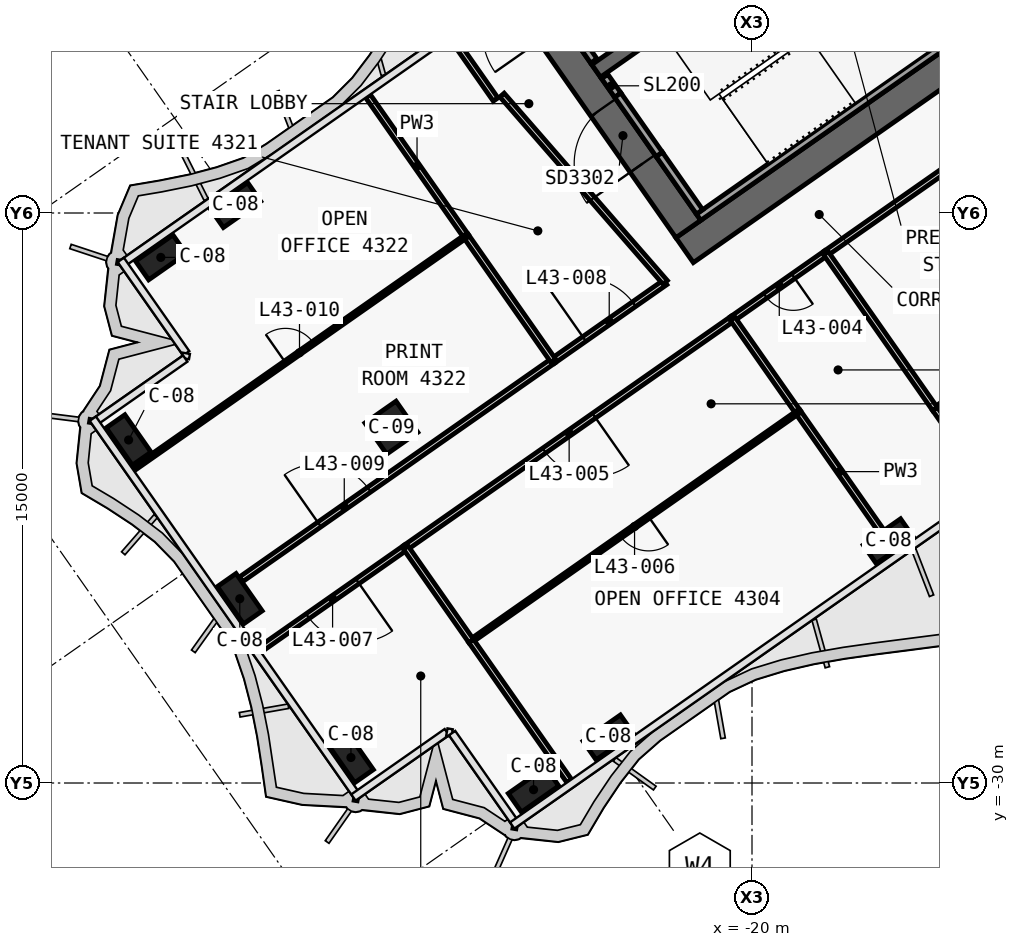
"""IFC4 building model, lengths in metres.
Left out: names, types, materials, properties, quantities, classifications, styles, units other than length and angle.
Written with IfcOpenShell. Run it as: python <this file> out.ifc"""

import sys

from ifc_helpers import new_model, si_unit, direction, frame, frame_2d, origin, origin_2d, place, context, subcontext, project, spatial, polyline, rectangle, outline, extrude, element, fill, save


model = new_model("IFC4")
c1 = context("Model", 3, precision=1e-05, world=origin(), true_north=direction((0.0, 1.0)))
c2 = subcontext(c1, "Body", "Model", "MODEL_VIEW")
j1 = project(units=[si_unit("LENGTHUNIT", "METRE"), si_unit("PLANEANGLEUNIT", "RADIAN")], contexts=[c1])
p1 = place(None, origin())
s1 = spatial("IfcSite", under=j1, at=p1, CompositionType="ELEMENT")
p2 = place(p1, origin())
s2 = spatial("IfcBuilding", under=s1, at=p2, CompositionType="ELEMENT")
p3 = place(p2, frame((0.0, 0.0, 186.6)))
s3 = spatial("IfcBuildingStorey", under=s2, at=p3, CompositionType="ELEMENT", Elevation=186.6)
p4 = place(p3, frame((0.029, -0.712, 0.0), z_axis=(0.0, 0.0, 1.0), x_axis=(-0.819151758019, -0.573576845187, 0.0)))
e1 = element("IfcWall", 1, at=p4, inside=s3, PredefinedType="SHEAR", context=c2, shape_type="SweptSolid", body=[
    extrude(outline(polyline([(26.616, 0.4), (0.56, 0.4), (-0.0, -0.4), (26.616, -0.4), (26.616, 0.4)])), origin(), (0.0, 0.0, 1.0), 3.9),
])
p5 = place(p4, frame((2.966, 0.0, 0.0)))
e2 = element("IfcOpeningElement", 2, at=p5, cuts=e1, PredefinedType="OPENING", context=c2, shape_type="SweptSolid", body=[
    extrude(rectangle(XDim=2.4, YDim=2.1, at=frame_2d((1.2, 1.05))), frame((0.0, 0.41, 0.0), z_axis=(0.0, -1.0, 0.0), x_axis=(1.0, 0.0, 0.0)), (0.0, 0.0, 1.0), 0.82),
])
p6 = place(p4, frame((11.916, 0.0, 0.0)))
e3 = element("IfcOpeningElement", 3, at=p6, cuts=e1, PredefinedType="OPENING", context=c2, shape_type="SweptSolid", body=[
    extrude(rectangle(XDim=2.4, YDim=2.1, at=frame_2d((1.2, 1.05))), frame((0.0, 0.41, 0.0), z_axis=(0.0, -1.0, 0.0), x_axis=(1.0, 0.0, 0.0)), (0.0, 0.0, 1.0), 0.82),
])
p7 = place(p3, frame((-21.675, -15.421, 0.0), z_axis=(0.0, 0.0, 1.0), x_axis=(-0.573581815061, 0.819148278049, 0.0)))
e4 = element("IfcWall", 4, at=p7, inside=s3, PredefinedType="SHEAR", context=c2, shape_type="SweptSolid", body=[
    extrude(outline(polyline([(0.0, 0.4), (0.0, -0.4), (9.6, -0.4), (9.6, 0.4), (0.0, 0.4)])), origin(), (0.0, 0.0, 1.0), 3.9),
])
p8 = place(p7, frame((6.3, 0.0, 0.0)))
e5 = element("IfcOpeningElement", 5, at=p8, cuts=e4, PredefinedType="OPENING", context=c2, shape_type="SweptSolid", body=[
    extrude(rectangle(XDim=1.8, YDim=2.1, at=frame_2d((0.9, 1.05))), frame((0.0, 0.41, 0.0), z_axis=(0.0, -1.0, 0.0), x_axis=(1.0, 0.0, 0.0)), (0.0, 0.0, 1.0), 0.82),
])
p9 = place(p7, frame((2.1, 0.0, 0.0)))
e6 = element("IfcOpeningElement", 6, at=p9, cuts=e4, PredefinedType="OPENING", context=c2, shape_type="SweptSolid", body=[
    extrude(rectangle(XDim=1.8, YDim=2.1, at=frame_2d((0.9, 1.05))), frame((0.0, 0.41, 0.0), z_axis=(0.0, -1.0, 0.0), x_axis=(1.0, 0.0, 0.0)), (0.0, 0.0, 1.0), 0.82),
])
p10 = place(p3, frame((-2.638, 3.768, 0.0), z_axis=(0.0, 0.0, 1.0), x_axis=(-0.81915267502, -0.573575535572, 0.0)))
e7 = element("IfcWall", 7, at=p10, inside=s3, PredefinedType="SHEAR", context=c2, shape_type="SweptSolid", body=[
    extrude(outline(polyline([(26.2, 0.2), (0.0, 0.2), (0.0, -0.2), (26.2, -0.2), (26.2, 0.2)])), origin(), (0.0, 0.0, 1.0), 3.9),
])
p11 = place(p10, frame((1.169, 0.0, 0.0)))
e8 = element("IfcOpeningElement", 8, at=p11, cuts=e7, PredefinedType="OPENING", context=c2, shape_type="SweptSolid", body=[
    extrude(rectangle(XDim=1.1, YDim=2.1, at=frame_2d((0.55, 1.05))), frame((0.0, 0.21, 0.0), z_axis=(0.0, -1.0, 0.0), x_axis=(1.0, 0.0, 0.0)), (0.0, 0.0, 1.0), 0.42),
])
p12 = place(p10, frame((3.206, 0.0, 0.0)))
e9 = element("IfcOpeningElement", 9, at=p12, cuts=e7, PredefinedType="OPENING", context=c2, shape_type="SweptSolid", body=[
    extrude(rectangle(XDim=1.1, YDim=2.1, at=frame_2d((0.55, 1.05))), frame((0.0, 0.21, 0.0), z_axis=(0.0, -1.0, 0.0), x_axis=(1.0, 0.0, 0.0)), (0.0, 0.0, 1.0), 0.42),
])
p13 = place(p10, frame((5.244, 0.0, 0.0)))
e10 = element("IfcOpeningElement", 10, at=p13, cuts=e7, PredefinedType="OPENING", context=c2, shape_type="SweptSolid", body=[
    extrude(rectangle(XDim=1.1, YDim=2.1, at=frame_2d((0.55, 1.05))), frame((0.0, 0.21, 0.0), z_axis=(0.0, -1.0, 0.0), x_axis=(1.0, 0.0, 0.0)), (0.0, 0.0, 1.0), 0.42),
])
p14 = place(p10, frame((7.281, 0.0, 0.0)))
e11 = element("IfcOpeningElement", 11, at=p14, cuts=e7, PredefinedType="OPENING", context=c2, shape_type="SweptSolid", body=[
    extrude(rectangle(XDim=1.1, YDim=2.1, at=frame_2d((0.55, 1.05))), frame((0.0, 0.21, 0.0), z_axis=(0.0, -1.0, 0.0), x_axis=(1.0, 0.0, 0.0)), (0.0, 0.0, 1.0), 0.42),
])
p15 = place(p10, frame((9.688, 0.0, 0.0)))
e12 = element("IfcOpeningElement", 12, at=p15, cuts=e7, PredefinedType="OPENING", context=c2, shape_type="SweptSolid", body=[
    extrude(rectangle(XDim=1.1, YDim=2.1, at=frame_2d((0.55, 1.05))), frame((0.0, 0.21, 0.0), z_axis=(0.0, -1.0, 0.0), x_axis=(1.0, 0.0, 0.0)), (0.0, 0.0, 1.0), 0.42),
])
p16 = place(p10, frame((11.863, 0.0, 0.0)))
e13 = element("IfcOpeningElement", 13, at=p16, cuts=e7, PredefinedType="OPENING", context=c2, shape_type="SweptSolid", body=[
    extrude(rectangle(XDim=1.1, YDim=2.1, at=frame_2d((0.55, 1.05))), frame((0.0, 0.21, 0.0), z_axis=(0.0, -1.0, 0.0), x_axis=(1.0, 0.0, 0.0)), (0.0, 0.0, 1.0), 0.42),
])
p17 = place(p10, frame((13.722, 0.0, 0.0)))
e14 = element("IfcOpeningElement", 14, at=p17, cuts=e7, PredefinedType="OPENING", context=c2, shape_type="SweptSolid", body=[
    extrude(rectangle(XDim=1.0, YDim=2.1, at=frame_2d((0.5, 1.05))), frame((0.0, 0.21, 0.0), z_axis=(0.0, -1.0, 0.0), x_axis=(1.0, 0.0, 0.0)), (0.0, 0.0, 1.0), 0.42),
])
p18 = place(p10, frame((15.798, 0.0, 0.0)))
e15 = element("IfcOpeningElement", 15, at=p18, cuts=e7, PredefinedType="OPENING", context=c2, shape_type="SweptSolid", body=[
    extrude(rectangle(XDim=1.0, YDim=2.1, at=frame_2d((0.5, 1.05))), frame((0.0, 0.21, 0.0), z_axis=(0.0, -1.0, 0.0), x_axis=(1.0, 0.0, 0.0)), (0.0, 0.0, 1.0), 0.42),
])
for number, where, z_axis, x_axis in (
    (16, (-16.41, -23.637, 0.0), (0.0, 0.0, 1.0), (-0.819, -0.574, 0.0)),
    (17, (-23.782, -28.799, 0.0), (0.0, 0.0, 1.0), (-0.819, -0.574, 0.0)),
    (18, (-25.748, -30.176, 0.0), (0.0, 0.0, 1.0), (-0.819, -0.574, 0.0)),
    (19, (-33.591, -14.792, 0.0), (0.0, 0.0, 1.0), (-0.819, -0.574, 0.0)),
    (20, (-35.556, -16.168, 0.0), (0.0, 0.0, 1.0), (-0.819, -0.574, 0.0)),
    (21, (-30.553, -29.329, 0.0), (0.0, 0.0, 1.0), (-0.574, 0.819, 0.0)),
    (22, (-33.479, -25.151, 0.0), (0.0, 0.0, 1.0), (-0.574, 0.819, 0.0)),
    (23, (-36.404, -20.973, 0.0), (0.0, 0.0, 1.0), (-0.574, 0.819, 0.0)),
):
    element("IfcColumn", number, at=place(p3, frame(where, z_axis=z_axis, x_axis=x_axis)), inside=s3, PredefinedType="COLUMN", context=c2, shape_type="SweptSolid", body=[
        extrude(rectangle(XDim=1.2, YDim=0.6, at=origin_2d()), origin(), (0.0, 0.0, 1.0), 3.9),
    ])
p19 = place(p3, frame((-29.49, -20.649, 0.0), z_axis=(0.0, 0.0, 1.0), x_axis=(-0.819152044289, -0.573576436351, 0.0)))
e24 = element("IfcColumn", 24, at=p19, inside=s3, PredefinedType="COLUMN", context=c2, shape_type="SweptSolid", body=[
    extrude(rectangle(XDim=1.0, YDim=1.0, at=origin_2d()), origin(), (0.0, 0.0, 1.0), 3.9),
])
p20 = place(p3, frame((-24.162, -10.998, 0.0), z_axis=(0.0, 0.0, 1.0), x_axis=(-0.573612502218, 0.819126789514, 0.0)))
e25 = element("IfcWall", 25, at=p20, inside=s3, PredefinedType="SOLIDWALL", context=c2, shape_type="SweptSolid", body=[
    extrude(rectangle(XDim=1.2, YDim=0.2, at=frame_2d((0.6, 0.0))), origin(), (0.0, 0.0, 1.0), 3.62),
])
p21 = place(p3, frame((-14.851, -10.521, 0.0), z_axis=(0.0, 0.0, 1.0), x_axis=(-0.819141584393, -0.57359137434, 0.0)))
e26 = element("IfcWall", 26, at=p21, inside=s3, PredefinedType="SOLIDWALL", context=c2, shape_type="SweptSolid", body=[
    extrude(rectangle(XDim=8.0, YDim=0.2, at=frame_2d((4.0, 0.0))), origin(), (0.0, 0.0, 1.0), 3.62),
])
p22 = place(p3, frame((-21.38, -14.97, 0.0), z_axis=(0.0, 0.0, 1.0), x_axis=(-0.573559770908, 0.819163713305, 0.0)))
e27 = element("IfcWall", 27, at=p22, inside=s3, PredefinedType="SOLIDWALL", context=c2, shape_type="SweptSolid", body=[
    extrude(rectangle(XDim=1.85, YDim=0.2, at=frame_2d((0.925, 0.0))), origin(), (0.0, 0.0, 1.0), 3.62),
])
p23 = place(p3, frame((-23.531, -11.898, 0.0), z_axis=(0.0, 0.0, 1.0), x_axis=(-0.573708088123, 0.819059844958, 0.0)))
e28 = element("IfcWall", 28, at=p23, inside=s3, PredefinedType="SOLIDWALL", context=c2, shape_type="SweptSolid", body=[
    extrude(rectangle(XDim=0.6, YDim=0.2, at=frame_2d((0.3, 0.0))), origin(), (0.0, 0.0, 1.0), 3.62),
])
p24 = place(p3, frame((-22.441, -13.455, 2.15), z_axis=(0.0, 0.0, 1.0), x_axis=(-0.573591692345, 0.819141361715, 0.0)))
e29 = element("IfcWall", 29, at=p24, inside=s3, PredefinedType="SOLIDWALL", context=c2, shape_type="SweptSolid", body=[
    extrude(rectangle(XDim=1.9, YDim=0.2, at=frame_2d((0.95, 0.0))), origin(), (0.0, 0.0, 1.0), 1.47),
])
p25 = place(p3, frame((-25.231, -18.888, 0.0), z_axis=(0.0, 0.0, 1.0), x_axis=(0.819152236293, 0.573576162141, 0.0)))
e30 = element("IfcWall", 30, at=p25, inside=s3, PredefinedType="PARTITIONING", context=c2, shape_type="SweptSolid", body=[
    extrude(rectangle(XDim=3.599, YDim=0.15, at=frame_2d((1.799, 0.0))), origin(), (0.0, 0.0, 1.0), 3.0),
])
p26 = place(p25, frame((1.0, 0.0, 0.0)))
e31 = element("IfcOpeningElement", 31, at=p26, cuts=e30, PredefinedType="OPENING", context=c2, shape_type="SweptSolid", body=[
    extrude(rectangle(XDim=1.6, YDim=2.1, at=frame_2d((0.8, 1.05))), frame((0.0, 0.085, 0.0), z_axis=(0.0, -1.0, 0.0), x_axis=(1.0, 0.0, 0.0)), (0.0, 0.0, 1.0), 0.17),
])
p27 = place(p3, frame((-33.445, -24.64, 0.0), z_axis=(0.0, 0.0, 1.0), x_axis=(0.819143874627, 0.57358810366, 0.0)))
e32 = element("IfcWall", 32, at=p27, inside=s3, PredefinedType="PARTITIONING", context=c2, shape_type="SweptSolid", body=[
    extrude(rectangle(XDim=10.032, YDim=0.15, at=frame_2d((5.016, 0.0))), origin(), (0.0, 0.0, 1.0), 3.0),
])
p28 = place(p27, frame((2.516, 0.0, 0.0)))
e33 = element("IfcOpeningElement", 33, at=p28, cuts=e32, PredefinedType="OPENING", context=c2, shape_type="SweptSolid", body=[
    extrude(rectangle(XDim=1.6, YDim=2.1, at=frame_2d((0.8, 1.05))), frame((0.0, 0.085, 0.0), z_axis=(0.0, -1.0, 0.0), x_axis=(1.0, 0.0, 0.0)), (0.0, 0.0, 1.0), 0.17),
])
p29 = place(p3, frame((-9.451, -10.036, 0.0), z_axis=(0.0, 0.0, 1.0), x_axis=(-0.819164214721, -0.57355905478, 0.0)))
e34 = element("IfcWall", 34, at=p29, inside=s3, PredefinedType="PARTITIONING", context=c2, shape_type="SweptSolid", body=[
    extrude(rectangle(XDim=10.504, YDim=0.15, at=frame_2d((5.252, 0.0))), origin(), (0.0, 0.0, 1.0), 3.0),
])
p30 = place(p29, frame((4.452, 0.0, 0.0)))
e35 = element("IfcOpeningElement", 35, at=p30, cuts=e34, PredefinedType="OPENING", context=c2, shape_type="SweptSolid", body=[
    extrude(rectangle(XDim=1.6, YDim=2.1, at=frame_2d((0.8, 1.05))), frame((0.0, 0.085, 0.0), z_axis=(0.0, -1.0, 0.0), x_axis=(1.0, 0.0, 0.0)), (0.0, 0.0, 1.0), 0.17),
])
p31 = place(p3, frame((-18.052, -16.058, 0.0), z_axis=(0.0, 0.0, 1.0), x_axis=(-0.819128818764, -0.573609604409, 0.0)))
e36 = element("IfcWall", 36, at=p31, inside=s3, PredefinedType="PARTITIONING", context=c2, shape_type="SweptSolid", body=[
    extrude(rectangle(XDim=3.004, YDim=0.15, at=frame_2d((1.502, 0.0))), origin(), (0.0, 0.0, 1.0), 3.0),
])
p32 = place(p31, frame((1.052, 0.0, 0.0)))
e37 = element("IfcOpeningElement", 37, at=p32, cuts=e36, PredefinedType="OPENING", context=c2, shape_type="SweptSolid", body=[
    extrude(rectangle(XDim=0.9, YDim=2.1, at=frame_2d((0.45, 1.05))), frame((0.0, 0.085, 0.0), z_axis=(0.0, -1.0, 0.0), x_axis=(1.0, 0.0, 0.0)), (0.0, 0.0, 1.0), 0.17),
])
p33 = place(p3, frame((-20.51, -17.779, 0.0), z_axis=(0.0, 0.0, 1.0), x_axis=(-0.819145647741, -0.57358557146, 0.0)))
e38 = element("IfcWall", 38, at=p33, inside=s3, PredefinedType="PARTITIONING", context=c2, shape_type="SweptSolid", body=[
    extrude(rectangle(XDim=10.504, YDim=0.15, at=frame_2d((5.252, 0.0))), origin(), (0.0, 0.0, 1.0), 3.0),
])
p34 = place(p33, frame((4.452, 0.0, 0.0)))
e39 = element("IfcOpeningElement", 39, at=p34, cuts=e38, PredefinedType="OPENING", context=c2, shape_type="SweptSolid", body=[
    extrude(rectangle(XDim=1.6, YDim=2.1, at=frame_2d((0.8, 1.05))), frame((0.0, 0.085, 0.0), z_axis=(0.0, -1.0, 0.0), x_axis=(1.0, 0.0, 0.0)), (0.0, 0.0, 1.0), 0.17),
])
p35 = place(p3, frame((-29.111, -23.802, 0.0), z_axis=(0.0, 0.0, 1.0), x_axis=(-0.819139214842, -0.573594758263, 0.0)))
e40 = element("IfcWall", 40, at=p35, inside=s3, PredefinedType="PARTITIONING", context=c2, shape_type="SweptSolid", body=[
    extrude(rectangle(XDim=4.702, YDim=0.15, at=frame_2d((2.351, 0.0))), origin(), (0.0, 0.0, 1.0), 2.9),
])
p36 = place(p35, frame((1.551, 0.0, 0.0)))
e41 = element("IfcOpeningElement", 41, at=p36, cuts=e40, PredefinedType="OPENING", context=c2, shape_type="SweptSolid", body=[
    extrude(rectangle(XDim=1.6, YDim=2.1, at=frame_2d((0.8, 1.05))), frame((0.0, 0.085, 0.0), z_axis=(0.0, -1.0, 0.0), x_axis=(1.0, 0.0, 0.0)), (0.0, 0.0, 1.0), 0.17),
])
p37 = place(p3, frame((-26.746, -12.014, 0.0), z_axis=(0.0, 0.0, 1.0), x_axis=(-0.573568836472, 0.819157365729, 0.0)))
e42 = element("IfcWall", 42, at=p37, inside=s3, PredefinedType="PARTITIONING", context=c2, shape_type="SweptSolid", body=[
    extrude(rectangle(XDim=2.0, YDim=0.15, at=frame_2d((1.0, 0.0))), origin(), (0.0, 0.0, 1.0), 3.0),
])
p38 = place(p3, frame((-22.284, -16.826, 0.0), z_axis=(0.0, 0.0, 1.0), x_axis=(-0.656758142177, 0.754101281449, 0.0)))
e43 = element("IfcWall", 43, at=p38, inside=s3, PredefinedType="PARTITIONING", context=c2, shape_type="SweptSolid", body=[
    extrude(rectangle(XDim=6.539, YDim=0.15, at=frame_2d((3.269, 0.0))), origin(), (0.0, 0.0, 1.0), 3.0),
])
p39 = place(p3, frame((-27.523, -15.611, 0.0), z_axis=(0.0, 0.0, 1.0), x_axis=(-0.573556991349, 0.819165659482, 0.0)))
e44 = element("IfcWall", 44, at=p39, inside=s3, PredefinedType="PARTITIONING", context=c2, shape_type="SweptSolid", body=[
    extrude(rectangle(XDim=4.501, YDim=0.15, at=frame_2d((2.25, 0.0))), origin(), (0.0, 0.0, 1.0), 3.0),
])
p40 = place(p3, frame((-25.23, -18.887, 0.0), z_axis=(0.0, 0.0, 1.0), x_axis=(-0.573589265117, 0.819143061341, 0.0)))
e45 = element("IfcWall", 45, at=p40, inside=s3, PredefinedType="PARTITIONING", context=c2, shape_type="SweptSolid", body=[
    extrude(rectangle(XDim=4.002, YDim=0.15, at=frame_2d((2.001, 0.0))), origin(), (0.0, 0.0, 1.0), 3.0),
])
p41 = place(p3, frame((-36.29, -21.747, 0.0), z_axis=(0.0, 0.0, 1.0), x_axis=(0.819153661249, 0.573574127085, 0.0)))
e46 = element("IfcWall", 46, at=p41, inside=s3, PredefinedType="PARTITIONING", context=c2, shape_type="SweptSolid", body=[
    extrude(rectangle(XDim=10.7, YDim=0.1, at=frame_2d((5.35, 0.0))), origin(), (0.0, 0.0, 1.0), 2.9),
])
p42 = place(p41, frame((4.9, 0.0, 0.0)))
e47 = element("IfcOpeningElement", 47, at=p42, cuts=e46, PredefinedType="OPENING", context=c2, shape_type="SweptSolid", body=[
    extrude(rectangle(XDim=0.9, YDim=2.1, at=frame_2d((0.45, 1.05))), frame((0.0, 0.06, 0.0), z_axis=(0.0, -1.0, 0.0), x_axis=(1.0, 0.0, 0.0)), (0.0, 0.0, 1.0), 0.12),
])
p43 = place(p3, frame((-6.584, -14.134, 0.0), z_axis=(0.0, 0.0, 1.0), x_axis=(-0.819163097304, -0.573560650686, 0.0)))
e48 = element("IfcWall", 48, at=p43, inside=s3, PredefinedType="PARTITIONING", context=c2, shape_type="SweptSolid", body=[
    extrude(rectangle(XDim=10.5, YDim=0.1, at=frame_2d((5.25, 0.0))), origin(), (0.0, 0.0, 1.0), 3.0),
])
p44 = place(p43, frame((4.8, 0.0, 0.0)))
e49 = element("IfcOpeningElement", 49, at=p44, cuts=e48, PredefinedType="OPENING", context=c2, shape_type="SweptSolid", body=[
    extrude(rectangle(XDim=0.9, YDim=2.1, at=frame_2d((0.45, 1.05))), frame((0.0, 0.06, 0.0), z_axis=(0.0, -1.0, 0.0), x_axis=(1.0, 0.0, 0.0)), (0.0, 0.0, 1.0), 0.12),
])
p45 = place(p3, frame((-13.752, -22.203, 0.0), z_axis=(0.0, 0.0, 1.0), x_axis=(-0.573626239584, 0.819117169433, 0.0)))
e50 = element("IfcWall", 50, at=p45, inside=s3, PredefinedType="PARTITIONING", context=c2, shape_type="SweptSolid", body=[
    extrude(rectangle(XDim=2.499, YDim=0.15, at=frame_2d((1.25, 0.0))), origin(), (0.0, 0.0, 1.0), 2.9),
])
p46 = place(p3, frame((-15.186, -20.155, 0.0), z_axis=(0.0, 0.0, 1.0), x_axis=(-0.573586866468, 0.819144740944, 0.0)))
e51 = element("IfcWall", 51, at=p46, inside=s3, PredefinedType="PARTITIONING", context=c2, shape_type="SweptSolid", body=[
    extrude(rectangle(XDim=5.0, YDim=0.15, at=frame_2d((2.5, 0.0))), origin(), (0.0, 0.0, 1.0), 3.62),
])
p47 = place(p3, frame((-16.594, -23.375, 0.0), z_axis=(0.0, 0.0, 1.0), x_axis=(-0.57359919792, 0.819136105995, 0.0)))
e52 = element("IfcWall", 52, at=p47, inside=s3, PredefinedType="PARTITIONING", context=c2, shape_type="SweptSolid", body=[
    extrude(rectangle(XDim=3.831, YDim=0.15, at=frame_2d((1.916, 0.0))), origin(), (0.0, 0.0, 1.0), 3.0),
])
p48 = place(p3, frame((-18.789, -20.239, 0.0), z_axis=(0.0, 0.0, 1.0), x_axis=(-0.573549676934, 0.819170780783, 0.0)))
e53 = element("IfcWall", 53, at=p48, inside=s3, PredefinedType="PARTITIONING", context=c2, shape_type="SweptSolid", body=[
    extrude(rectangle(XDim=3.002, YDim=0.15, at=frame_2d((1.501, 0.0))), origin(), (0.0, 0.0, 1.0), 3.0),
])
p49 = place(p3, frame((-18.79, -20.239, 0.0), z_axis=(0.0, 0.0, 1.0), x_axis=(-0.819155448096, -0.573571575181, 0.0)))
e54 = element("IfcWall", 54, at=p49, inside=s3, PredefinedType="PARTITIONING", context=c2, shape_type="SweptSolid", body=[
    extrude(rectangle(XDim=10.5, YDim=0.1, at=frame_2d((5.25, 0.0))), origin(), (0.0, 0.0, 1.0), 3.0),
])
p50 = place(p49, frame((4.8, 0.0, 0.0)))
e55 = element("IfcOpeningElement", 55, at=p50, cuts=e54, PredefinedType="OPENING", context=c2, shape_type="SweptSolid", body=[
    extrude(rectangle(XDim=0.9, YDim=2.1, at=frame_2d((0.45, 1.05))), frame((0.0, 0.06, 0.0), z_axis=(0.0, -1.0, 0.0), x_axis=(1.0, 0.0, 0.0)), (0.0, 0.0, 1.0), 0.12),
])
p51 = place(p3, frame((-24.81, -29.946, 0.0), z_axis=(0.0, 0.0, 1.0), x_axis=(-0.573589807488, 0.819142681555, 0.0)))
e56 = element("IfcWall", 56, at=p51, inside=s3, PredefinedType="PARTITIONING", context=c2, shape_type="SweptSolid", body=[
    extrude(rectangle(XDim=4.499, YDim=0.15, at=frame_2d((2.25, 0.0))), origin(), (0.0, 0.0, 1.0), 2.9),
])
p52 = place(p3, frame((-27.392, -26.26, 0.0), z_axis=(0.0, 0.0, 1.0), x_axis=(-0.573560650686, 0.819163097304, 0.0)))
e57 = element("IfcWall", 57, at=p52, inside=s3, PredefinedType="PARTITIONING", context=c2, shape_type="SweptSolid", body=[
    extrude(rectangle(XDim=3.0, YDim=0.15, at=frame_2d((1.5, 0.0))), origin(), (0.0, 0.0, 1.0), 3.62),
])
p53 = place(p9, origin())
e58 = element("IfcDoor", 58, at=p53, inside=s3, OperationType="DOUBLE_DOOR_SINGLE_SWING", PredefinedType="DOOR", context=c2, shape_type="SweptSolid", body=[
    extrude(rectangle(XDim=1.8, YDim=2.1, at=frame_2d((0.9, 1.05))), frame((0.0, 0.025, 0.0), z_axis=(0.0, -1.0, 0.0), x_axis=(1.0, 0.0, 0.0)), (0.0, 0.0, 1.0), 0.05),
])
fill(e6, e58)
p54 = place(p32, origin())
e59 = element("IfcDoor", 59, at=p54, inside=s3, OperationType="SINGLE_SWING_LEFT", PredefinedType="DOOR", context=c2, shape_type="SweptSolid", body=[
    extrude(rectangle(XDim=0.9, YDim=2.1, at=frame_2d((0.45, 1.05))), frame((0.0, 0.025, 0.0), z_axis=(0.0, -1.0, 0.0), x_axis=(1.0, 0.0, 0.0)), (0.0, 0.0, 1.0), 0.05),
])
fill(e37, e59)
p55 = place(p34, origin())
e60 = element("IfcDoor", 60, at=p55, inside=s3, OperationType="DOUBLE_DOOR_SINGLE_SWING", PredefinedType="DOOR", context=c2, shape_type="SweptSolid", body=[
    extrude(rectangle(XDim=1.6, YDim=2.1, at=frame_2d((0.8, 1.05))), frame((0.0, 0.025, 0.0), z_axis=(0.0, -1.0, 0.0), x_axis=(1.0, 0.0, 0.0)), (0.0, 0.0, 1.0), 0.05),
])
fill(e39, e60)
p56 = place(p50, origin())
e61 = element("IfcDoor", 61, at=p56, inside=s3, OperationType="SINGLE_SWING_LEFT", PredefinedType="DOOR", context=c2, shape_type="SweptSolid", body=[
    extrude(rectangle(XDim=0.9, YDim=2.1, at=frame_2d((0.45, 1.05))), frame((0.0, 0.025, 0.0), z_axis=(0.0, -1.0, 0.0), x_axis=(1.0, 0.0, 0.0)), (0.0, 0.0, 1.0), 0.05),
])
fill(e55, e61)
p57 = place(p36, origin())
e62 = element("IfcDoor", 62, at=p57, inside=s3, OperationType="DOUBLE_DOOR_SINGLE_SWING", PredefinedType="DOOR", context=c2, shape_type="SweptSolid", body=[
    extrude(rectangle(XDim=1.6, YDim=2.1, at=frame_2d((0.8, 1.05))), frame((0.0, 0.025, 0.0), z_axis=(0.0, -1.0, 0.0), x_axis=(1.0, 0.0, 0.0)), (0.0, 0.0, 1.0), 0.05),
])
fill(e41, e62)
p58 = place(p26, origin())
e63 = element("IfcDoor", 63, at=p58, inside=s3, OperationType="DOUBLE_DOOR_SINGLE_SWING", PredefinedType="DOOR", context=c2, shape_type="SweptSolid", body=[
    extrude(rectangle(XDim=1.6, YDim=2.1, at=frame_2d((0.8, 1.05))), frame((0.0, 0.025, 0.0), z_axis=(0.0, -1.0, 0.0), x_axis=(1.0, 0.0, 0.0)), (0.0, 0.0, 1.0), 0.05),
])
fill(e31, e63)
p59 = place(p28, origin())
e64 = element("IfcDoor", 64, at=p59, inside=s3, OperationType="DOUBLE_DOOR_SINGLE_SWING", PredefinedType="DOOR", context=c2, shape_type="SweptSolid", body=[
    extrude(rectangle(XDim=1.6, YDim=2.1, at=frame_2d((0.8, 1.05))), frame((0.0, 0.025, 0.0), z_axis=(0.0, -1.0, 0.0), x_axis=(1.0, 0.0, 0.0)), (0.0, 0.0, 1.0), 0.05),
])
fill(e33, e64)
p60 = place(p42, origin())
e65 = element("IfcDoor", 65, at=p60, inside=s3, OperationType="SINGLE_SWING_RIGHT", PredefinedType="DOOR", context=c2, shape_type="SweptSolid", body=[
    extrude(rectangle(XDim=0.9, YDim=2.1, at=frame_2d((0.45, 1.05))), frame((0.0, 0.025, 0.0), z_axis=(0.0, -1.0, 0.0), x_axis=(1.0, 0.0, 0.0)), (0.0, 0.0, 1.0), 0.05),
])
fill(e47, e65)
save(model, sys.argv[1])
